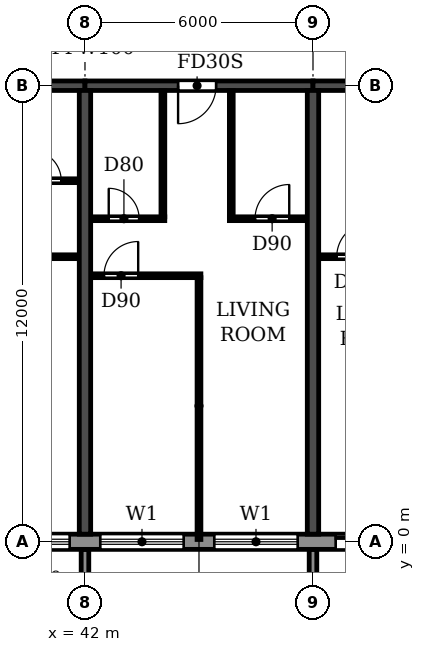
"""IFC4 building model, lengths in metres.
Left out: names, types, materials, properties, quantities, classifications, styles, units other than length and angle.
Written with IfcOpenShell. Run it as: python <this file> out.ifc"""

import sys

from ifc_helpers import new_model, si_unit, direction, frame, frame_2d, origin, place, context, subcontext, project, spatial, polyline, rectangle, outline, extrude, source, transform, mapped, element, fill, save


model = new_model("IFC4")
c1 = context("Model", 3, precision=1e-05, world=origin(), true_north=direction((0.0, 1.0)))
c2 = subcontext(c1, "Body", "Model", "MODEL_VIEW")
j1 = project(units=[si_unit("LENGTHUNIT", "METRE"), si_unit("PLANEANGLEUNIT", "RADIAN")], contexts=[c1])
p1 = place(None, origin())
s1 = spatial("IfcSite", under=j1, at=p1, CompositionType="ELEMENT")
p2 = place(p1, origin())
s2 = spatial("IfcBuilding", under=s1, at=p2, CompositionType="ELEMENT")
p3 = place(p2, frame((0.0, 0.0, 132.3)))
s3 = spatial("IfcBuildingStorey", under=s2, at=p3, CompositionType="ELEMENT", Elevation=132.3)
for number, where, z_axis, x_axis in (
    (1, (42.0, 0.2, 0.0), (0.0, 0.0, 1.0), (0.0, 1.0, 0.0)),
    (2, (48.0, 0.2, 0.0), (0.0, 0.0, 1.0), (0.0, 1.0, 0.0)),
):
    element("IfcWall", number, at=place(p3, frame(where, z_axis=z_axis, x_axis=x_axis)), inside=s3, PredefinedType="SHEAR", context=c2, shape_type="SweptSolid", body=[
        extrude(rectangle(XDim=11.675, YDim=0.3, at=frame_2d((5.837, 0.0))), origin(), (0.0, 0.0, 1.0), 3.07),
    ])
p4 = place(p3, frame((36.0, 12.0, 0.0), z_axis=(0.0, 0.0, 1.0), x_axis=(1.0, 0.0, 0.0)))
e3 = element("IfcWall", 3, at=p4, inside=s3, PredefinedType="SHEAR", context=c2, shape_type="SweptSolid", body=[
    extrude(rectangle(XDim=6.0, YDim=0.25, at=frame_2d((3.0, 0.0))), origin(), (0.0, 0.0, 1.0), 2.47),
])
p5 = place(p4, frame((2.55, 0.0, 0.0)))
e4 = element("IfcOpeningElement", 4, at=p5, cuts=e3, PredefinedType="OPENING", context=c2, shape_type="SweptSolid", body=[
    extrude(rectangle(XDim=1.0, YDim=2.1, at=frame_2d((0.5, 1.05))), frame((0.0, 0.135, 0.0), z_axis=(0.0, -1.0, 0.0), x_axis=(1.0, 0.0, 0.0)), (0.0, 0.0, 1.0), 0.27),
])
p6 = place(p3, frame((42.0, 12.0, 0.0), z_axis=(0.0, 0.0, 1.0), x_axis=(1.0, 0.0, 0.0)))
e5 = element("IfcWall", 5, at=p6, inside=s3, PredefinedType="SHEAR", context=c2, shape_type="SweptSolid", body=[
    extrude(rectangle(XDim=6.0, YDim=0.25, at=frame_2d((3.0, 0.0))), origin(), (0.0, 0.0, 1.0), 2.47),
])
p7 = place(p6, frame((2.45, 0.0, 0.0)))
e6 = element("IfcOpeningElement", 6, at=p7, cuts=e5, PredefinedType="OPENING", context=c2, shape_type="SweptSolid", body=[
    extrude(rectangle(XDim=1.0, YDim=2.1, at=frame_2d((0.5, 1.05))), frame((0.0, 0.135, 0.0), z_axis=(0.0, -1.0, 0.0), x_axis=(1.0, 0.0, 0.0)), (0.0, 0.0, 1.0), 0.27),
])
p8 = place(p3, frame((48.0, 12.0, 0.0), z_axis=(0.0, 0.0, 1.0), x_axis=(1.0, 0.0, 0.0)))
e7 = element("IfcWall", 7, at=p8, inside=s3, PredefinedType="SHEAR", context=c2, shape_type="SweptSolid", body=[
    extrude(rectangle(XDim=6.0, YDim=0.25, at=frame_2d((3.0, 0.0))), origin(), (0.0, 0.0, 1.0), 2.47),
])
p9 = place(p8, frame((2.55, 0.0, 0.0)))
e8 = element("IfcOpeningElement", 8, at=p9, cuts=e7, PredefinedType="OPENING", context=c2, shape_type="SweptSolid", body=[
    extrude(rectangle(XDim=1.0, YDim=2.1, at=frame_2d((0.5, 1.05))), frame((0.0, 0.135, 0.0), z_axis=(0.0, -1.0, 0.0), x_axis=(1.0, 0.0, 0.0)), (0.0, 0.0, 1.0), 0.27),
])
p10 = place(p3, frame((16.683, 0.0, 0.0), z_axis=(0.0, 0.0, 1.0), x_axis=(1.0, 0.0, 0.0)))
e9 = element("IfcWall", 9, at=p10, inside=s3, PredefinedType="STANDARD", context=c2, shape_type="SweptSolid", body=[
    extrude(rectangle(XDim=68.634, YDim=0.4, at=frame_2d((34.317, 0.0))), origin(), (0.0, 0.0, 1.0), 3.07),
])
p11 = place(p10, frame((1.717, 0.0, 0.9)))
e10 = element("IfcOpeningElement", 10, at=p11, cuts=e9, PredefinedType="OPENING", context=c2, shape_type="SweptSolid", body=[
    extrude(rectangle(XDim=2.2, YDim=1.5, at=frame_2d((1.1, 0.75))), frame((0.0, 0.21, 0.0), z_axis=(0.0, -1.0, 0.0), x_axis=(1.0, 0.0, 0.0)), (0.0, 0.0, 1.0), 0.42),
])
p12 = place(p10, frame((4.717, 0.0, 0.9)))
e11 = element("IfcOpeningElement", 11, at=p12, cuts=e9, PredefinedType="OPENING", context=c2, shape_type="SweptSolid", body=[
    extrude(rectangle(XDim=2.2, YDim=1.5, at=frame_2d((1.1, 0.75))), frame((0.0, 0.21, 0.0), z_axis=(0.0, -1.0, 0.0), x_axis=(1.0, 0.0, 0.0)), (0.0, 0.0, 1.0), 0.42),
])
p13 = place(p10, frame((7.717, 0.0, 0.9)))
e12 = element("IfcOpeningElement", 12, at=p13, cuts=e9, PredefinedType="OPENING", context=c2, shape_type="SweptSolid", body=[
    extrude(rectangle(XDim=2.2, YDim=1.5, at=frame_2d((1.1, 0.75))), frame((0.0, 0.21, 0.0), z_axis=(0.0, -1.0, 0.0), x_axis=(1.0, 0.0, 0.0)), (0.0, 0.0, 1.0), 0.42),
])
p14 = place(p10, frame((10.917, 0.0, 0.0)))
e13 = element("IfcOpeningElement", 13, at=p14, cuts=e9, PredefinedType="OPENING", context=c2, shape_type="SweptSolid", body=[
    extrude(rectangle(XDim=1.8, YDim=2.4, at=frame_2d((0.9, 1.2))), frame((0.0, 0.21, 0.0), z_axis=(0.0, -1.0, 0.0), x_axis=(1.0, 0.0, 0.0)), (0.0, 0.0, 1.0), 0.42),
])
p15 = place(p10, frame((13.717, 0.0, 0.9)))
e14 = element("IfcOpeningElement", 14, at=p15, cuts=e9, PredefinedType="OPENING", context=c2, shape_type="SweptSolid", body=[
    extrude(rectangle(XDim=2.2, YDim=1.5, at=frame_2d((1.1, 0.75))), frame((0.0, 0.21, 0.0), z_axis=(0.0, -1.0, 0.0), x_axis=(1.0, 0.0, 0.0)), (0.0, 0.0, 1.0), 0.42),
])
p16 = place(p10, frame((16.717, 0.0, 0.9)))
e15 = element("IfcOpeningElement", 15, at=p16, cuts=e9, PredefinedType="OPENING", context=c2, shape_type="SweptSolid", body=[
    extrude(rectangle(XDim=2.2, YDim=1.5, at=frame_2d((1.1, 0.75))), frame((0.0, 0.21, 0.0), z_axis=(0.0, -1.0, 0.0), x_axis=(1.0, 0.0, 0.0)), (0.0, 0.0, 1.0), 0.42),
])
p17 = place(p10, frame((19.917, 0.0, 0.0)))
e16 = element("IfcOpeningElement", 16, at=p17, cuts=e9, PredefinedType="OPENING", context=c2, shape_type="SweptSolid", body=[
    extrude(rectangle(XDim=1.8, YDim=2.4, at=frame_2d((0.9, 1.2))), frame((0.0, 0.21, 0.0), z_axis=(0.0, -1.0, 0.0), x_axis=(1.0, 0.0, 0.0)), (0.0, 0.0, 1.0), 0.42),
])
p18 = place(p10, frame((22.717, 0.0, 0.9)))
e17 = element("IfcOpeningElement", 17, at=p18, cuts=e9, PredefinedType="OPENING", context=c2, shape_type="SweptSolid", body=[
    extrude(rectangle(XDim=2.2, YDim=1.5, at=frame_2d((1.1, 0.75))), frame((0.0, 0.21, 0.0), z_axis=(0.0, -1.0, 0.0), x_axis=(1.0, 0.0, 0.0)), (0.0, 0.0, 1.0), 0.42),
])
p19 = place(p10, frame((25.717, 0.0, 0.9)))
e18 = element("IfcOpeningElement", 18, at=p19, cuts=e9, PredefinedType="OPENING", context=c2, shape_type="SweptSolid", body=[
    extrude(rectangle(XDim=2.2, YDim=1.5, at=frame_2d((1.1, 0.75))), frame((0.0, 0.21, 0.0), z_axis=(0.0, -1.0, 0.0), x_axis=(1.0, 0.0, 0.0)), (0.0, 0.0, 1.0), 0.42),
])
p20 = place(p10, frame((28.717, 0.0, 0.9)))
e19 = element("IfcOpeningElement", 19, at=p20, cuts=e9, PredefinedType="OPENING", context=c2, shape_type="SweptSolid", body=[
    extrude(rectangle(XDim=2.2, YDim=1.5, at=frame_2d((1.1, 0.75))), frame((0.0, 0.21, 0.0), z_axis=(0.0, -1.0, 0.0), x_axis=(1.0, 0.0, 0.0)), (0.0, 0.0, 1.0), 0.42),
])
p21 = place(p10, frame((31.917, 0.0, 0.0)))
e20 = element("IfcOpeningElement", 20, at=p21, cuts=e9, PredefinedType="OPENING", context=c2, shape_type="SweptSolid", body=[
    extrude(rectangle(XDim=1.8, YDim=2.4, at=frame_2d((0.9, 1.2))), frame((0.0, 0.21, 0.0), z_axis=(0.0, -1.0, 0.0), x_axis=(1.0, 0.0, 0.0)), (0.0, 0.0, 1.0), 0.42),
])
p22 = place(p10, frame((34.717, 0.0, 0.9)))
e21 = element("IfcOpeningElement", 21, at=p22, cuts=e9, PredefinedType="OPENING", context=c2, shape_type="SweptSolid", body=[
    extrude(rectangle(XDim=2.2, YDim=1.5, at=frame_2d((1.1, 0.75))), frame((0.0, 0.21, 0.0), z_axis=(0.0, -1.0, 0.0), x_axis=(1.0, 0.0, 0.0)), (0.0, 0.0, 1.0), 0.42),
])
p23 = place(p10, frame((37.717, 0.0, 0.9)))
e22 = element("IfcOpeningElement", 22, at=p23, cuts=e9, PredefinedType="OPENING", context=c2, shape_type="SweptSolid", body=[
    extrude(rectangle(XDim=2.2, YDim=1.5, at=frame_2d((1.1, 0.75))), frame((0.0, 0.21, 0.0), z_axis=(0.0, -1.0, 0.0), x_axis=(1.0, 0.0, 0.0)), (0.0, 0.0, 1.0), 0.42),
])
p24 = place(p10, frame((40.717, 0.0, 0.9)))
e23 = element("IfcOpeningElement", 23, at=p24, cuts=e9, PredefinedType="OPENING", context=c2, shape_type="SweptSolid", body=[
    extrude(rectangle(XDim=2.2, YDim=1.5, at=frame_2d((1.1, 0.75))), frame((0.0, 0.21, 0.0), z_axis=(0.0, -1.0, 0.0), x_axis=(1.0, 0.0, 0.0)), (0.0, 0.0, 1.0), 0.42),
])
p25 = place(p10, frame((43.717, 0.0, 0.9)))
e24 = element("IfcOpeningElement", 24, at=p25, cuts=e9, PredefinedType="OPENING", context=c2, shape_type="SweptSolid", body=[
    extrude(rectangle(XDim=2.2, YDim=1.5, at=frame_2d((1.1, 0.75))), frame((0.0, 0.21, 0.0), z_axis=(0.0, -1.0, 0.0), x_axis=(1.0, 0.0, 0.0)), (0.0, 0.0, 1.0), 0.42),
])
p26 = place(p10, frame((46.917, 0.0, 0.0)))
e25 = element("IfcOpeningElement", 25, at=p26, cuts=e9, PredefinedType="OPENING", context=c2, shape_type="SweptSolid", body=[
    extrude(rectangle(XDim=1.8, YDim=2.4, at=frame_2d((0.9, 1.2))), frame((0.0, 0.21, 0.0), z_axis=(0.0, -1.0, 0.0), x_axis=(1.0, 0.0, 0.0)), (0.0, 0.0, 1.0), 0.42),
])
p27 = place(p10, frame((49.717, 0.0, 0.9)))
e26 = element("IfcOpeningElement", 26, at=p27, cuts=e9, PredefinedType="OPENING", context=c2, shape_type="SweptSolid", body=[
    extrude(rectangle(XDim=2.2, YDim=1.5, at=frame_2d((1.1, 0.75))), frame((0.0, 0.21, 0.0), z_axis=(0.0, -1.0, 0.0), x_axis=(1.0, 0.0, 0.0)), (0.0, 0.0, 1.0), 0.42),
])
p28 = place(p10, frame((52.717, 0.0, 0.9)))
e27 = element("IfcOpeningElement", 27, at=p28, cuts=e9, PredefinedType="OPENING", context=c2, shape_type="SweptSolid", body=[
    extrude(rectangle(XDim=2.2, YDim=1.5, at=frame_2d((1.1, 0.75))), frame((0.0, 0.21, 0.0), z_axis=(0.0, -1.0, 0.0), x_axis=(1.0, 0.0, 0.0)), (0.0, 0.0, 1.0), 0.42),
])
p29 = place(p10, frame((55.717, 0.0, 0.9)))
e28 = element("IfcOpeningElement", 28, at=p29, cuts=e9, PredefinedType="OPENING", context=c2, shape_type="SweptSolid", body=[
    extrude(rectangle(XDim=2.2, YDim=1.5, at=frame_2d((1.1, 0.75))), frame((0.0, 0.21, 0.0), z_axis=(0.0, -1.0, 0.0), x_axis=(1.0, 0.0, 0.0)), (0.0, 0.0, 1.0), 0.42),
])
p30 = place(p10, frame((58.917, 0.0, 0.0)))
e29 = element("IfcOpeningElement", 29, at=p30, cuts=e9, PredefinedType="OPENING", context=c2, shape_type="SweptSolid", body=[
    extrude(rectangle(XDim=1.8, YDim=2.4, at=frame_2d((0.9, 1.2))), frame((0.0, 0.21, 0.0), z_axis=(0.0, -1.0, 0.0), x_axis=(1.0, 0.0, 0.0)), (0.0, 0.0, 1.0), 0.42),
])
p31 = place(p10, frame((61.717, 0.0, 0.9)))
e30 = element("IfcOpeningElement", 30, at=p31, cuts=e9, PredefinedType="OPENING", context=c2, shape_type="SweptSolid", body=[
    extrude(rectangle(XDim=2.2, YDim=1.5, at=frame_2d((1.1, 0.75))), frame((0.0, 0.21, 0.0), z_axis=(0.0, -1.0, 0.0), x_axis=(1.0, 0.0, 0.0)), (0.0, 0.0, 1.0), 0.42),
])
p32 = place(p10, frame((64.717, 0.0, 0.9)))
e31 = element("IfcOpeningElement", 31, at=p32, cuts=e9, PredefinedType="OPENING", context=c2, shape_type="SweptSolid", body=[
    extrude(rectangle(XDim=2.2, YDim=1.5, at=frame_2d((1.1, 0.75))), frame((0.0, 0.21, 0.0), z_axis=(0.0, -1.0, 0.0), x_axis=(1.0, 0.0, 0.0)), (0.0, 0.0, 1.0), 0.42),
])
m1 = source(origin(), c2, "Body", "SweptSolid", [
    extrude(outline(polyline([(0.0, 0.0), (0.2, 0.0), (0.2, 1.65), (0.0, 1.65), (0.0, 0.0)])), origin(), (0.0, 0.0, 1.0), 3.1),
])
for number, where in (
    (32, (41.9, -1.85, 0.0)),
    (33, (47.9, -1.85, 0.0)),
):
    element("IfcWall", number, at=place(p3, frame(where)), inside=s3, PredefinedType="STANDARD", context=c2, shape_type="MappedRepresentation", body=[
        mapped(m1, transform((0.0, 0.0, 0.0))),
    ])
p33 = place(p3, frame((42.16, 7.0, 0.0), z_axis=(0.0, 0.0, 1.0), x_axis=(1.0, 0.0, 0.0)))
e34 = element("IfcWall", 34, at=p33, inside=s3, PredefinedType="PARTITIONING", context=c2, shape_type="SweptSolid", body=[
    extrude(rectangle(XDim=2.89, YDim=0.1, at=frame_2d((1.445, 0.0))), origin(), (0.0, 0.0, 1.0), 3.07),
])
p34 = place(p33, frame((0.34, 0.0, 0.0)))
e35 = element("IfcOpeningElement", 35, at=p34, cuts=e34, PredefinedType="OPENING", context=c2, shape_type="SweptSolid", body=[
    extrude(rectangle(XDim=0.9, YDim=2.1, at=frame_2d((0.45, 1.05))), frame((0.0, 0.06, 0.0), z_axis=(0.0, -1.0, 0.0), x_axis=(1.0, 0.0, 0.0)), (0.0, 0.0, 1.0), 0.12),
])
p35 = place(p3, frame((38.95, 7.5, 0.0), z_axis=(0.0, 0.0, 1.0), x_axis=(1.0, 0.0, 0.0)))
e36 = element("IfcWall", 36, at=p35, inside=s3, PredefinedType="PARTITIONING", context=c2, shape_type="SweptSolid", body=[
    extrude(rectangle(XDim=2.89, YDim=0.1, at=frame_2d((1.445, 0.0))), origin(), (0.0, 0.0, 1.0), 3.07),
])
p36 = place(p35, frame((0.55, 0.0, 0.0)))
e37 = element("IfcOpeningElement", 37, at=p36, cuts=e36, PredefinedType="OPENING", context=c2, shape_type="SweptSolid", body=[
    extrude(rectangle(XDim=0.9, YDim=2.1, at=frame_2d((0.45, 1.05))), frame((0.0, 0.06, 0.0), z_axis=(0.0, -1.0, 0.0), x_axis=(1.0, 0.0, 0.0)), (0.0, 0.0, 1.0), 0.12),
])
p37 = place(p3, frame((48.16, 7.5, 0.0), z_axis=(0.0, 0.0, 1.0), x_axis=(1.0, 0.0, 0.0)))
e38 = element("IfcWall", 38, at=p37, inside=s3, PredefinedType="PARTITIONING", context=c2, shape_type="SweptSolid", body=[
    extrude(rectangle(XDim=2.04, YDim=0.1, at=frame_2d((1.02, 0.0))), origin(), (0.0, 0.0, 1.0), 3.07),
])
p38 = place(p37, frame((0.465, 0.0, 0.0)))
e39 = element("IfcOpeningElement", 39, at=p38, cuts=e38, PredefinedType="OPENING", context=c2, shape_type="SweptSolid", body=[
    extrude(rectangle(XDim=0.9, YDim=2.1, at=frame_2d((0.45, 1.05))), frame((0.0, 0.06, 0.0), z_axis=(0.0, -1.0, 0.0), x_axis=(1.0, 0.0, 0.0)), (0.0, 0.0, 1.0), 0.12),
])
p39 = place(p3, frame((42.16, 8.5, 0.0), z_axis=(0.0, 0.0, 1.0), x_axis=(1.0, 0.0, 0.0)))
e40 = element("IfcWall", 40, at=p39, inside=s3, PredefinedType="PARTITIONING", context=c2, shape_type="SweptSolid", body=[
    extrude(rectangle(XDim=1.94, YDim=0.1, at=frame_2d((0.97, 0.0))), origin(), (0.0, 0.0, 1.0), 3.07),
])
p40 = place(p39, frame((0.465, 0.0, 0.0)))
e41 = element("IfcOpeningElement", 41, at=p40, cuts=e40, PredefinedType="OPENING", context=c2, shape_type="SweptSolid", body=[
    extrude(rectangle(XDim=0.8, YDim=2.1, at=frame_2d((0.4, 1.05))), frame((0.0, 0.06, 0.0), z_axis=(0.0, -1.0, 0.0), x_axis=(1.0, 0.0, 0.0)), (0.0, 0.0, 1.0), 0.12),
])
p41 = place(p3, frame((45.8, 8.5, 0.0), z_axis=(0.0, 0.0, 1.0), x_axis=(1.0, 0.0, 0.0)))
e42 = element("IfcWall", 42, at=p41, inside=s3, PredefinedType="PARTITIONING", context=c2, shape_type="SweptSolid", body=[
    extrude(rectangle(XDim=2.04, YDim=0.1, at=frame_2d((1.02, 0.0))), origin(), (0.0, 0.0, 1.0), 3.07),
])
p42 = place(p41, frame((0.675, 0.0, 0.0)))
e43 = element("IfcOpeningElement", 43, at=p42, cuts=e42, PredefinedType="OPENING", context=c2, shape_type="SweptSolid", body=[
    extrude(rectangle(XDim=0.9, YDim=2.1, at=frame_2d((0.45, 1.05))), frame((0.0, 0.06, 0.0), z_axis=(0.0, -1.0, 0.0), x_axis=(1.0, 0.0, 0.0)), (0.0, 0.0, 1.0), 0.12),
])
p43 = place(p3, frame((39.9, 9.5, 0.0), z_axis=(0.0, 0.0, 1.0), x_axis=(1.0, 0.0, 0.0)))
e44 = element("IfcWall", 44, at=p43, inside=s3, PredefinedType="PARTITIONING", context=c2, shape_type="SweptSolid", body=[
    extrude(rectangle(XDim=1.94, YDim=0.1, at=frame_2d((0.97, 0.0))), origin(), (0.0, 0.0, 1.0), 3.07),
])
p44 = place(p43, frame((0.675, 0.0, 0.0)))
e45 = element("IfcOpeningElement", 45, at=p44, cuts=e44, PredefinedType="OPENING", context=c2, shape_type="SweptSolid", body=[
    extrude(rectangle(XDim=0.8, YDim=2.1, at=frame_2d((0.4, 1.05))), frame((0.0, 0.06, 0.0), z_axis=(0.0, -1.0, 0.0), x_axis=(1.0, 0.0, 0.0)), (0.0, 0.0, 1.0), 0.12),
])
p45 = place(p3, frame((44.05, 8.55, 0.0), z_axis=(0.0, 0.0, 1.0), x_axis=(0.0, 1.0, 0.0)))
e46 = element("IfcWall", 46, at=p45, inside=s3, PredefinedType="PARTITIONING", context=c2, shape_type="SweptSolid", body=[
    extrude(rectangle(XDim=3.315, YDim=0.1, at=frame_2d((1.657, 0.0))), origin(), (0.0, 0.0, 1.0), 3.07),
])
p46 = place(p3, frame((45.0, 0.06, 0.0), z_axis=(0.0, 0.0, 1.0), x_axis=(0.0, 1.0, 0.0)))
e47 = element("IfcWall", 47, at=p46, inside=s3, PredefinedType="PARTITIONING", context=c2, shape_type="SweptSolid", body=[
    extrude(rectangle(XDim=6.89, YDim=0.1, at=frame_2d((3.445, 0.0))), origin(), (0.0, 0.0, 1.0), 3.07),
])
p47 = place(p3, frame((45.85, 8.55, 0.0), z_axis=(0.0, 0.0, 1.0), x_axis=(0.0, 1.0, 0.0)))
e48 = element("IfcWall", 48, at=p47, inside=s3, PredefinedType="PARTITIONING", context=c2, shape_type="SweptSolid", body=[
    extrude(rectangle(XDim=3.315, YDim=0.1, at=frame_2d((1.657, 0.0))), origin(), (0.0, 0.0, 1.0), 3.07),
])
p48 = place(p18, origin())
e49 = element("IfcWindow", 49, at=p48, inside=s3, PartitioningType="DOUBLE_PANEL_HORIZONTAL", PredefinedType="WINDOW", context=c2, shape_type="SweptSolid", body=[
    extrude(rectangle(XDim=2.2, YDim=1.5, at=frame_2d((1.1, 0.75))), frame((0.0, 0.03, 0.0), z_axis=(0.0, -1.0, 0.0), x_axis=(1.0, 0.0, 0.0)), (0.0, 0.0, 1.0), 0.06),
])
fill(e17, e49)
p49 = place(p19, origin())
e50 = element("IfcWindow", 50, at=p49, inside=s3, PartitioningType="DOUBLE_PANEL_HORIZONTAL", PredefinedType="WINDOW", context=c2, shape_type="SweptSolid", body=[
    extrude(rectangle(XDim=2.2, YDim=1.5, at=frame_2d((1.1, 0.75))), frame((0.0, 0.03, 0.0), z_axis=(0.0, -1.0, 0.0), x_axis=(1.0, 0.0, 0.0)), (0.0, 0.0, 1.0), 0.06),
])
fill(e18, e50)
p50 = place(p20, origin())
e51 = element("IfcWindow", 51, at=p50, inside=s3, PartitioningType="DOUBLE_PANEL_HORIZONTAL", PredefinedType="WINDOW", context=c2, shape_type="SweptSolid", body=[
    extrude(rectangle(XDim=2.2, YDim=1.5, at=frame_2d((1.1, 0.75))), frame((0.0, 0.03, 0.0), z_axis=(0.0, -1.0, 0.0), x_axis=(1.0, 0.0, 0.0)), (0.0, 0.0, 1.0), 0.06),
])
fill(e19, e51)
p51 = place(p21, origin())
e52 = element("IfcDoor", 52, at=p51, inside=s3, OperationType="DOUBLE_DOOR_SLIDING", PredefinedType="DOOR", context=c2, shape_type="SweptSolid", body=[
    extrude(rectangle(XDim=1.8, YDim=2.4, at=frame_2d((0.9, 1.2))), frame((0.0, 0.025, 0.0), z_axis=(0.0, -1.0, 0.0), x_axis=(1.0, 0.0, 0.0)), (0.0, 0.0, 1.0), 0.05),
])
fill(e20, e52)
p52 = place(p44, origin())
e53 = element("IfcDoor", 53, at=p52, inside=s3, OperationType="SINGLE_SWING_LEFT", PredefinedType="DOOR", context=c2, shape_type="SweptSolid", body=[
    extrude(rectangle(XDim=0.8, YDim=2.1, at=frame_2d((0.4, 1.05))), frame((0.0, 0.025, 0.0), z_axis=(0.0, -1.0, 0.0), x_axis=(1.0, 0.0, 0.0)), (0.0, 0.0, 1.0), 0.05),
])
fill(e45, e53)
p53 = place(p34, origin())
e54 = element("IfcDoor", 54, at=p53, inside=s3, OperationType="SINGLE_SWING_RIGHT", PredefinedType="DOOR", context=c2, shape_type="SweptSolid", body=[
    extrude(rectangle(XDim=0.9, YDim=2.1, at=frame_2d((0.45, 1.05))), frame((0.0, 0.025, 0.0), z_axis=(0.0, -1.0, 0.0), x_axis=(1.0, 0.0, 0.0)), (0.0, 0.0, 1.0), 0.05),
])
fill(e35, e54)
p54 = place(p40, origin())
e55 = element("IfcDoor", 55, at=p54, inside=s3, OperationType="SINGLE_SWING_LEFT", PredefinedType="DOOR", context=c2, shape_type="SweptSolid", body=[
    extrude(rectangle(XDim=0.8, YDim=2.1, at=frame_2d((0.4, 1.05))), frame((0.0, 0.025, 0.0), z_axis=(0.0, -1.0, 0.0), x_axis=(1.0, 0.0, 0.0)), (0.0, 0.0, 1.0), 0.05),
])
fill(e41, e55)
p55 = place(p7, frame((1.0, 0.0, 0.0), z_axis=(0.0, 0.0, 1.0), x_axis=(-1.0, 0.0, 0.0)))
e56 = element("IfcDoor", 56, at=p55, inside=s3, OperationType="SINGLE_SWING_RIGHT", PredefinedType="DOOR", context=c2, shape_type="SweptSolid", body=[
    extrude(rectangle(XDim=1.0, YDim=2.1, at=frame_2d((0.5, 1.05))), frame((0.0, 0.025, 0.0), z_axis=(0.0, -1.0, 0.0), x_axis=(1.0, 0.0, 0.0)), (0.0, 0.0, 1.0), 0.05),
])
fill(e6, e56)
p56 = place(p42, origin())
e57 = element("IfcDoor", 57, at=p56, inside=s3, OperationType="SINGLE_SWING_RIGHT", PredefinedType="DOOR", context=c2, shape_type="SweptSolid", body=[
    extrude(rectangle(XDim=0.9, YDim=2.1, at=frame_2d((0.45, 1.05))), frame((0.0, 0.025, 0.0), z_axis=(0.0, -1.0, 0.0), x_axis=(1.0, 0.0, 0.0)), (0.0, 0.0, 1.0), 0.05),
])
fill(e43, e57)
p57 = place(p38, origin())
e58 = element("IfcDoor", 58, at=p57, inside=s3, OperationType="SINGLE_SWING_RIGHT", PredefinedType="DOOR", context=c2, shape_type="SweptSolid", body=[
    extrude(rectangle(XDim=0.9, YDim=2.1, at=frame_2d((0.45, 1.05))), frame((0.0, 0.025, 0.0), z_axis=(0.0, -1.0, 0.0), x_axis=(1.0, 0.0, 0.0)), (0.0, 0.0, 1.0), 0.05),
])
fill(e39, e58)
save(model, sys.argv[1])
